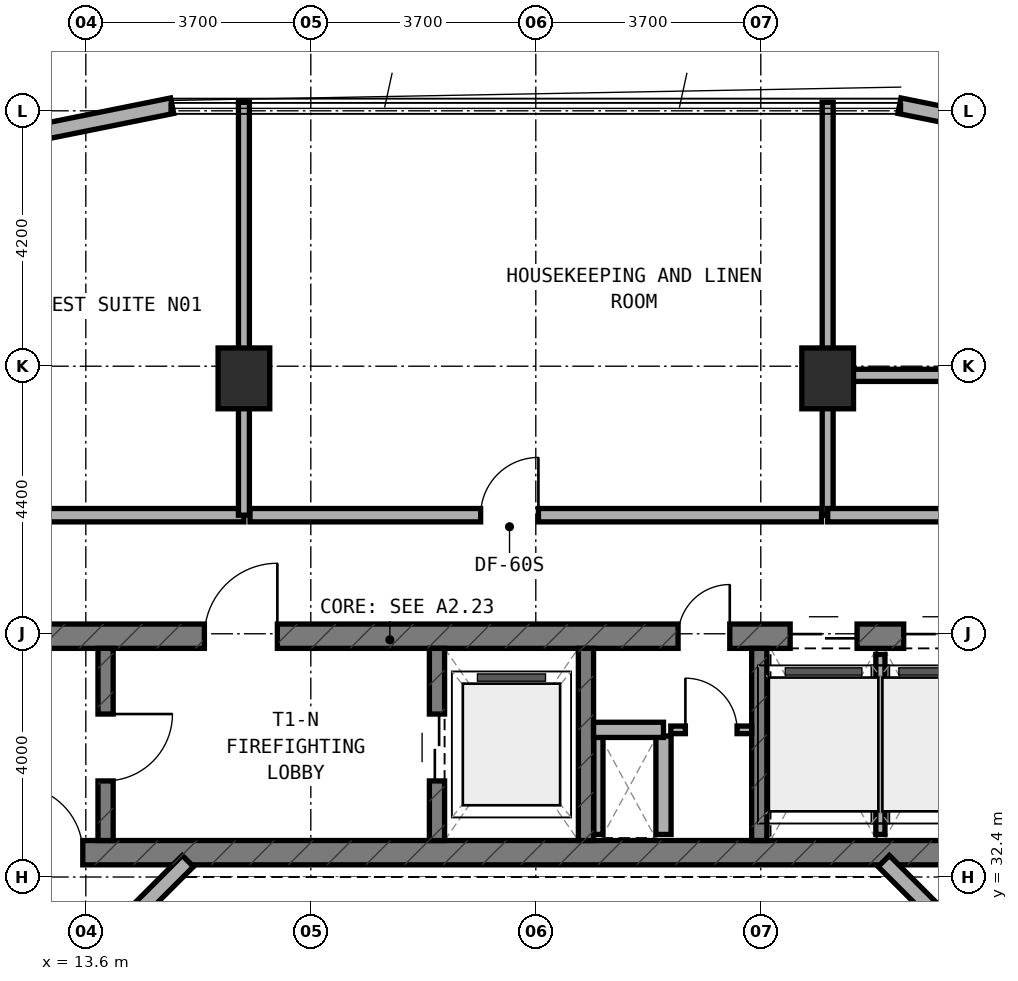
"""IFC4 building model, lengths in metres.
Left out: names, types, materials, properties, quantities, classifications, styles, units other than length and angle.
Written with IfcOpenShell. Run it as: python <this file> out.ifc"""

import sys

from ifc_helpers import new_model, si_unit, direction, frame, frame_2d, origin, origin_2d, place, context, subcontext, project, spatial, rectangle, extrude, element, fill, save


model = new_model("IFC4")
c1 = context("Model", 3, precision=1e-05, world=origin(), true_north=direction((0.0, 1.0)))
c2 = subcontext(c1, "Body", "Model", "MODEL_VIEW")
j1 = project(units=[si_unit("LENGTHUNIT", "METRE"), si_unit("PLANEANGLEUNIT", "RADIAN")], contexts=[c1])
p1 = place(None, origin())
s1 = spatial("IfcSite", under=j1, at=p1, CompositionType="ELEMENT")
p2 = place(p1, origin())
s2 = spatial("IfcBuilding", under=s1, at=p2, CompositionType="ELEMENT")
p3 = place(p2, frame((0.0, 0.0, 98.5)))
s3 = spatial("IfcBuildingStorey", under=s2, at=p3, CompositionType="ELEMENT", Elevation=98.5)
p4 = place(p3, frame((6.4, 32.8, 0.0), z_axis=(0.0, 0.0, 1.0), x_axis=(1.0, 0.0, 0.0)))
e1 = element("IfcWall", 1, at=p4, inside=s3, PredefinedType="SHEAR", context=c2, shape_type="SweptSolid", body=[
    extrude(rectangle(XDim=24.4, YDim=0.4, at=frame_2d((12.2, 0.0))), origin(), (0.0, 0.0, 1.0), 3.5),
])
p5 = place(p4, frame((6.05, 0.0, 0.0)))
e2 = element("IfcOpeningElement", 2, at=p5, cuts=e1, PredefinedType="OPENING", context=c2, shape_type="SweptSolid", body=[
    extrude(rectangle(XDim=1.1, YDim=2.15, at=frame_2d((0.55, 1.075))), frame((0.0, 0.21, 0.0), z_axis=(0.0, -1.0, 0.0), x_axis=(1.0, 0.0, 0.0)), (0.0, 0.0, 1.0), 0.42),
])
p6 = place(p3, frame((6.4, 36.36, 0.0), z_axis=(0.0, 0.0, 1.0), x_axis=(1.0, 0.0, 0.0)))
e3 = element("IfcWall", 3, at=p6, inside=s3, PredefinedType="SHEAR", context=c2, shape_type="SweptSolid", body=[
    extrude(rectangle(XDim=24.4, YDim=0.4, at=frame_2d((12.2, 0.0))), origin(), (0.0, 0.0, 1.0), 3.5),
])
p7 = place(p6, frame((9.15, 0.0, 0.0)))
e4 = element("IfcOpeningElement", 4, at=p7, cuts=e3, PredefinedType="OPENING", context=c2, shape_type="SweptSolid", body=[
    extrude(rectangle(XDim=1.2, YDim=2.15, at=frame_2d((0.6, 1.075))), frame((0.0, 0.21, 0.0), z_axis=(0.0, -1.0, 0.0), x_axis=(1.0, 0.0, 0.0)), (0.0, 0.0, 1.0), 0.42),
])
p8 = place(p6, frame((16.94, 0.0, 0.0)))
e5 = element("IfcOpeningElement", 5, at=p8, cuts=e3, PredefinedType="OPENING", context=c2, shape_type="SweptSolid", body=[
    extrude(rectangle(XDim=0.85, YDim=2.1, at=frame_2d((0.425, 1.05))), frame((0.0, 0.21, 0.0), z_axis=(0.0, -1.0, 0.0), x_axis=(1.0, 0.0, 0.0)), (0.0, 0.0, 1.0), 0.42),
])
p9 = place(p6, frame((18.783, 0.0, 0.0)))
e6 = element("IfcOpeningElement", 6, at=p9, cuts=e3, PredefinedType="OPENING", context=c2, shape_type="SweptSolid", body=[
    extrude(rectangle(XDim=1.1, YDim=2.15, at=frame_2d((0.55, 1.075))), frame((0.0, 0.21, 0.0), z_axis=(0.0, -1.0, 0.0), x_axis=(1.0, 0.0, 0.0)), (0.0, 0.0, 1.0), 0.42),
])
p10 = place(p6, frame((20.65, 0.0, 0.0)))
e7 = element("IfcOpeningElement", 7, at=p10, cuts=e3, PredefinedType="OPENING", context=c2, shape_type="SweptSolid", body=[
    extrude(rectangle(XDim=1.1, YDim=2.15, at=frame_2d((0.55, 1.075))), frame((0.0, 0.21, 0.0), z_axis=(0.0, -1.0, 0.0), x_axis=(1.0, 0.0, 0.0)), (0.0, 0.0, 1.0), 0.42),
])
p11 = place(p6, frame((22.517, 0.0, 0.0)))
e8 = element("IfcOpeningElement", 8, at=p11, cuts=e3, PredefinedType="OPENING", context=c2, shape_type="SweptSolid", body=[
    extrude(rectangle(XDim=1.1, YDim=2.15, at=frame_2d((0.55, 1.075))), frame((0.0, 0.21, 0.0), z_axis=(0.0, -1.0, 0.0), x_axis=(1.0, 0.0, 0.0)), (0.0, 0.0, 1.0), 0.42),
])
p12 = place(p3, frame((13.925, 33.0, 0.0), z_axis=(0.0, 0.0, 1.0), x_axis=(0.0, 1.0, 0.0)))
e9 = element("IfcWall", 9, at=p12, inside=s3, PredefinedType="STANDARD", context=c2, shape_type="SweptSolid", body=[
    extrude(rectangle(XDim=3.16, YDim=0.25, at=frame_2d((1.58, 0.0))), origin(), (0.0, 0.0, 1.0), 3.22),
])
p13 = place(p12, frame((0.98, 0.0, 0.0)))
e10 = element("IfcOpeningElement", 10, at=p13, cuts=e9, PredefinedType="OPENING", context=c2, shape_type="SweptSolid", body=[
    extrude(rectangle(XDim=1.1, YDim=2.15, at=frame_2d((0.55, 1.075))), frame((0.0, 0.135, 0.0), z_axis=(0.0, -1.0, 0.0), x_axis=(1.0, 0.0, 0.0)), (0.0, 0.0, 1.0), 0.27),
])
p14 = place(p3, frame((19.375, 33.0, 0.0), z_axis=(0.0, 0.0, 1.0), x_axis=(0.0, 1.0, 0.0)))
e11 = element("IfcWall", 11, at=p14, inside=s3, PredefinedType="STANDARD", context=c2, shape_type="SweptSolid", body=[
    extrude(rectangle(XDim=3.16, YDim=0.25, at=frame_2d((1.58, 0.0))), origin(), (0.0, 0.0, 1.0), 3.22),
])
p15 = place(p14, frame((0.98, 0.0, 0.0)))
e12 = element("IfcOpeningElement", 12, at=p15, cuts=e11, PredefinedType="OPENING", context=c2, shape_type="SweptSolid", body=[
    extrude(rectangle(XDim=1.1, YDim=2.15, at=frame_2d((0.55, 1.075))), frame((0.0, 0.135, 0.0), z_axis=(0.0, -1.0, 0.0), x_axis=(1.0, 0.0, 0.0)), (0.0, 0.0, 1.0), 0.27),
])
for number, where, z_axis, x_axis in (
    (13, (21.825, 33.0, 0.0), (0.0, 0.0, 1.0), (0.0, 1.0, 0.0)),
    (14, (24.675, 33.0, 0.0), (0.0, 0.0, 1.0), (0.0, 1.0, 0.0)),
):
    element("IfcWall", number, at=place(p3, frame(where, z_axis=z_axis, x_axis=x_axis)), inside=s3, PredefinedType="STANDARD", context=c2, shape_type="SweptSolid", body=[
        extrude(rectangle(XDim=3.16, YDim=0.25, at=frame_2d((1.58, 0.0))), origin(), (0.0, 0.0, 1.0), 3.22),
    ])
for number, where, z_axis, x_axis in (
    (15, (16.2, 40.6, 0.0), (0.0, 0.0, 1.0), (1.0, 0.0, 0.0)),
    (16, (25.8, 40.6, 0.0), (0.0, 0.0, 1.0), (1.0, 0.0, 0.0)),
):
    element("IfcColumn", number, at=place(p3, frame(where, z_axis=z_axis, x_axis=x_axis)), inside=s3, PredefinedType="COLUMN", context=c2, shape_type="SweptSolid", body=[
        extrude(rectangle(XDim=0.85, YDim=1.0, at=origin_2d()), origin(), (0.0, 0.0, 1.0), 3.5),
    ])
p16 = place(p3, frame((35.982, 43.271, 0.0), z_axis=(0.0, 0.0, 1.0), x_axis=(-0.980315963543, 0.197435082048, 0.0)))
e17 = element("IfcWall", 17, at=p16, inside=s3, PredefinedType="STANDARD", context=c2, shape_type="SweptSolid", body=[
    extrude(rectangle(XDim=9.183, YDim=0.26, at=frame_2d((4.591, 0.0))), origin(), (0.0, 0.0, 1.0), 3.22),
])
p17 = place(p16, frame((4.337, 0.0, 0.8)))
e18 = element("IfcOpeningElement", 18, at=p17, cuts=e17, PredefinedType="OPENING", context=c2, shape_type="SweptSolid", body=[
    extrude(rectangle(XDim=2.4, YDim=1.6, at=frame_2d((1.2, 0.8))), frame((0.0, 0.14, 0.0), z_axis=(0.0, -1.0, 0.0), x_axis=(1.0, 0.0, 0.0)), (0.0, 0.0, 1.0), 0.28),
])
p18 = place(p3, frame((15.02, 45.084, 0.0), z_axis=(0.0, 0.0, 1.0), x_axis=(-0.980315963543, -0.197435082048, 0.0)))
e19 = element("IfcWall", 19, at=p18, inside=s3, PredefinedType="STANDARD", context=c2, shape_type="SweptSolid", body=[
    extrude(rectangle(XDim=9.183, YDim=0.26, at=frame_2d((4.591, 0.0))), origin(), (0.0, 0.0, 1.0), 3.22),
])
p19 = place(p18, frame((3.391, 0.0, 0.8)))
e20 = element("IfcOpeningElement", 20, at=p19, cuts=e19, PredefinedType="OPENING", context=c2, shape_type="SweptSolid", body=[
    extrude(rectangle(XDim=2.4, YDim=1.6, at=frame_2d((1.2, 0.8))), frame((0.0, 0.14, 0.0), z_axis=(0.0, -1.0, 0.0), x_axis=(1.0, 0.0, 0.0)), (0.0, 0.0, 1.0), 0.28),
])
for number, where, z_axis, x_axis in (
    (21, (28.556, 30.828, 0.0), (0.0, 0.0, 1.0), (-0.707, 0.707, 0.0)),
    (22, (15.278, 32.662, 0.0), (0.0, 0.0, 1.0), (-0.707, -0.707, 0.0)),
):
    element("IfcWall", number, at=place(p3, frame(where, z_axis=z_axis, x_axis=x_axis)), inside=s3, PredefinedType="STANDARD", context=c2, shape_type="SweptSolid", body=[
        extrude(rectangle(XDim=2.594, YDim=0.26, at=frame_2d((1.297, 0.0))), origin(), (0.0, 0.0, 1.0), 3.22),
    ])
p20 = place(p3, frame((22.03, 33.1, 0.0), z_axis=(0.0, 0.0, 1.0), x_axis=(0.0, 1.0, 0.0)))
e23 = element("IfcWall", 23, at=p20, inside=s3, PredefinedType="PARTITIONING", context=c2, shape_type="SweptSolid", body=[
    extrude(rectangle(XDim=1.62, YDim=0.15, at=frame_2d((0.81, 0.0))), origin(), (0.0, 0.0, 1.0), 3.22),
])
p21 = place(p3, frame((23.1, 33.1, 0.0), z_axis=(0.0, 0.0, 1.0), x_axis=(0.0, 1.0, 0.0)))
e24 = element("IfcWall", 24, at=p21, inside=s3, PredefinedType="SOLIDWALL", context=c2, shape_type="SweptSolid", body=[
    extrude(rectangle(XDim=1.62, YDim=0.25, at=frame_2d((0.81, 0.0))), origin(), (0.0, 0.0, 1.0), 3.22),
])
p22 = place(p3, frame((21.95, 34.82, 0.0), z_axis=(0.0, 0.0, 1.0), x_axis=(1.0, 0.0, 0.0)))
e25 = element("IfcWall", 25, at=p22, inside=s3, PredefinedType="SOLIDWALL", context=c2, shape_type="SweptSolid", body=[
    extrude(rectangle(XDim=1.15, YDim=0.25, at=frame_2d((0.575, 0.0))), origin(), (0.0, 0.0, 1.0), 3.22),
])
p23 = place(p3, frame((23.22, 34.82, 0.0), z_axis=(0.0, 0.0, 1.0), x_axis=(1.0, 0.0, 0.0)))
e26 = element("IfcWall", 26, at=p23, inside=s3, PredefinedType="PARTITIONING", context=c2, shape_type="SweptSolid", body=[
    extrude(rectangle(XDim=1.33, YDim=0.125, at=frame_2d((0.665, 0.0))), origin(), (0.0, 0.0, 1.0), 3.22),
])
p24 = place(p23, frame((0.24, 0.0, 0.0)))
e27 = element("IfcOpeningElement", 27, at=p24, cuts=e26, PredefinedType="OPENING", context=c2, shape_type="SweptSolid", body=[
    extrude(rectangle(XDim=0.85, YDim=2.1, at=frame_2d((0.425, 1.05))), frame((0.0, 0.073, 0.0), z_axis=(0.0, -1.0, 0.0), x_axis=(1.0, 0.0, 0.0)), (0.0, 0.0, 1.0), 0.145),
])
p25 = place(p3, frame((26.667, 33.1, 0.0), z_axis=(0.0, 0.0, 1.0), x_axis=(0.0, 1.0, 0.0)))
e28 = element("IfcWall", 28, at=p25, inside=s3, PredefinedType="PARTITIONING", context=c2, shape_type="SweptSolid", body=[
    extrude(rectangle(XDim=2.96, YDim=0.15, at=frame_2d((1.48, 0.0))), origin(), (0.0, 0.0, 1.0), 3.22),
])
p26 = place(p3, frame((5.55, 38.35, 0.0), z_axis=(0.0, 0.0, 1.0), x_axis=(1.0, 0.0, 0.0)))
e29 = element("IfcWall", 29, at=p26, inside=s3, PredefinedType="SOLIDWALL", context=c2, shape_type="SweptSolid", body=[
    extrude(rectangle(XDim=10.65, YDim=0.22, at=frame_2d((5.325, 0.0))), origin(), (0.0, 0.0, 1.0), 2.595),
])
p27 = place(p26, frame((4.85, 0.0, 0.0)))
e30 = element("IfcOpeningElement", 30, at=p27, cuts=e29, PredefinedType="OPENING", context=c2, shape_type="SweptSolid", body=[
    extrude(rectangle(XDim=0.95, YDim=2.1, at=frame_2d((0.475, 1.05))), frame((0.0, 0.12, 0.0), z_axis=(0.0, -1.0, 0.0), x_axis=(1.0, 0.0, 0.0)), (0.0, 0.0, 1.0), 0.24),
])
p28 = place(p3, frame((16.2, 38.35, 0.0), z_axis=(0.0, 0.0, 1.0), x_axis=(0.0, 1.0, 0.0)))
e31 = element("IfcWall", 31, at=p28, inside=s3, PredefinedType="SOLIDWALL", context=c2, shape_type="SweptSolid", body=[
    extrude(rectangle(XDim=6.79, YDim=0.18, at=frame_2d((3.395, 0.0))), origin(), (0.0, 0.0, 1.0), 2.595),
])
p29 = place(p3, frame((16.3, 38.35, 0.0), z_axis=(0.0, 0.0, 1.0), x_axis=(1.0, 0.0, 0.0)))
e32 = element("IfcWall", 32, at=p29, inside=s3, PredefinedType="SOLIDWALL", context=c2, shape_type="SweptSolid", body=[
    extrude(rectangle(XDim=9.4, YDim=0.22, at=frame_2d((4.7, 0.0))), origin(), (0.0, 0.0, 1.0), 3.22),
])
p30 = place(p29, frame((3.793, 0.0, 0.0)))
e33 = element("IfcOpeningElement", 33, at=p30, cuts=e32, PredefinedType="OPENING", context=c2, shape_type="SweptSolid", body=[
    extrude(rectangle(XDim=0.95, YDim=2.1, at=frame_2d((0.475, 1.05))), frame((0.0, 0.12, 0.0), z_axis=(0.0, -1.0, 0.0), x_axis=(1.0, 0.0, 0.0)), (0.0, 0.0, 1.0), 0.24),
])
p31 = place(p3, frame((25.8, 38.35, 0.0), z_axis=(0.0, 0.0, 1.0), x_axis=(0.0, 1.0, 0.0)))
e34 = element("IfcWall", 34, at=p31, inside=s3, PredefinedType="SOLIDWALL", context=c2, shape_type="SweptSolid", body=[
    extrude(rectangle(XDim=6.79, YDim=0.18, at=frame_2d((3.395, 0.0))), origin(), (0.0, 0.0, 1.0), 2.595),
])
p32 = place(p3, frame((25.9, 40.65, 0.0), z_axis=(0.0, 0.0, 1.0), x_axis=(1.0, 0.0, 0.0)))
e35 = element("IfcWall", 35, at=p32, inside=s3, PredefinedType="PLUMBINGWALL", context=c2, shape_type="SweptSolid", body=[
    extrude(rectangle(XDim=2.0, YDim=0.2, at=frame_2d((1.0, 0.0))), origin(), (0.0, 0.0, 1.0), 2.835),
])
p33 = place(p3, frame((25.8, 38.35, 0.0), z_axis=(0.0, 0.0, 1.0), x_axis=(1.0, 0.0, 0.0)))
e36 = element("IfcWall", 36, at=p33, inside=s3, PredefinedType="SOLIDWALL", context=c2, shape_type="SweptSolid", body=[
    extrude(rectangle(XDim=2.2, YDim=0.22, at=frame_2d((1.1, 0.0))), origin(), (0.0, 0.0, 1.0), 2.595),
])
p34 = place(p13, frame((1.1, 0.0, 0.0), z_axis=(0.0, 0.0, 1.0), x_axis=(-1.0, 0.0, 0.0)))
e37 = element("IfcDoor", 37, at=p34, inside=s3, OperationType="SINGLE_SWING_LEFT", PredefinedType="DOOR", context=c2, shape_type="SweptSolid", body=[
    extrude(rectangle(XDim=1.1, YDim=2.15, at=frame_2d((0.55, 1.075))), frame((0.0, 0.025, 0.0), z_axis=(0.0, -1.0, 0.0), x_axis=(1.0, 0.0, 0.0)), (0.0, 0.0, 1.0), 0.05),
])
fill(e10, e37)
p35 = place(p7, origin())
e38 = element("IfcDoor", 38, at=p35, inside=s3, OperationType="SINGLE_SWING_RIGHT", PredefinedType="DOOR", context=c2, shape_type="SweptSolid", body=[
    extrude(rectangle(XDim=1.2, YDim=2.15, at=frame_2d((0.6, 1.075))), frame((0.0, 0.025, 0.0), z_axis=(0.0, -1.0, 0.0), x_axis=(1.0, 0.0, 0.0)), (0.0, 0.0, 1.0), 0.05),
])
fill(e4, e38)
p36 = place(p15, origin())
e39 = element("IfcDoor", 39, at=p36, inside=s3, OperationType="DOUBLE_DOOR_SLIDING", PredefinedType="DOOR", context=c2, shape_type="SweptSolid", body=[
    extrude(rectangle(XDim=1.1, YDim=2.15, at=frame_2d((0.55, 1.075))), frame((0.0, 0.025, 0.0), z_axis=(0.0, -1.0, 0.0), x_axis=(1.0, 0.0, 0.0)), (0.0, 0.0, 1.0), 0.05),
])
fill(e12, e39)
p37 = place(p8, origin())
e40 = element("IfcDoor", 40, at=p37, inside=s3, OperationType="SINGLE_SWING_RIGHT", PredefinedType="DOOR", context=c2, shape_type="SweptSolid", body=[
    extrude(rectangle(XDim=0.85, YDim=2.1, at=frame_2d((0.425, 1.05))), frame((0.0, 0.025, 0.0), z_axis=(0.0, -1.0, 0.0), x_axis=(1.0, 0.0, 0.0)), (0.0, 0.0, 1.0), 0.05),
])
fill(e5, e40)
p38 = place(p9, origin())
e41 = element("IfcDoor", 41, at=p38, inside=s3, OperationType="DOUBLE_DOOR_SLIDING", PredefinedType="DOOR", context=c2, shape_type="SweptSolid", body=[
    extrude(rectangle(XDim=1.1, YDim=2.15, at=frame_2d((0.55, 1.075))), frame((0.0, 0.025, 0.0), z_axis=(0.0, -1.0, 0.0), x_axis=(1.0, 0.0, 0.0)), (0.0, 0.0, 1.0), 0.05),
])
fill(e6, e41)
p39 = place(p10, origin())
e42 = element("IfcDoor", 42, at=p39, inside=s3, OperationType="DOUBLE_DOOR_SLIDING", PredefinedType="DOOR", context=c2, shape_type="SweptSolid", body=[
    extrude(rectangle(XDim=1.1, YDim=2.15, at=frame_2d((0.55, 1.075))), frame((0.0, 0.025, 0.0), z_axis=(0.0, -1.0, 0.0), x_axis=(1.0, 0.0, 0.0)), (0.0, 0.0, 1.0), 0.05),
])
fill(e7, e42)
p40 = place(p5, origin())
e43 = element("IfcDoor", 43, at=p40, inside=s3, OperationType="SINGLE_SWING_LEFT", PredefinedType="DOOR", context=c2, shape_type="SweptSolid", body=[
    extrude(rectangle(XDim=1.1, YDim=2.15, at=frame_2d((0.55, 1.075))), frame((0.0, 0.025, 0.0), z_axis=(0.0, -1.0, 0.0), x_axis=(1.0, 0.0, 0.0)), (0.0, 0.0, 1.0), 0.05),
])
fill(e2, e43)
p41 = place(p24, origin())
e44 = element("IfcDoor", 44, at=p41, inside=s3, OperationType="SINGLE_SWING_LEFT", PredefinedType="DOOR", context=c2, shape_type="SweptSolid", body=[
    extrude(rectangle(XDim=0.85, YDim=2.1, at=frame_2d((0.425, 1.05))), frame((0.0, 0.025, 0.0), z_axis=(0.0, -1.0, 0.0), x_axis=(1.0, 0.0, 0.0)), (0.0, 0.0, 1.0), 0.05),
])
fill(e27, e44)
p42 = place(p30, origin())
e45 = element("IfcDoor", 45, at=p42, inside=s3, OperationType="SINGLE_SWING_RIGHT", PredefinedType="DOOR", context=c2, shape_type="SweptSolid", body=[
    extrude(rectangle(XDim=0.95, YDim=2.1, at=frame_2d((0.475, 1.05))), frame((0.0, 0.025, 0.0), z_axis=(0.0, -1.0, 0.0), x_axis=(1.0, 0.0, 0.0)), (0.0, 0.0, 1.0), 0.05),
])
fill(e33, e45)
save(model, sys.argv[1])
